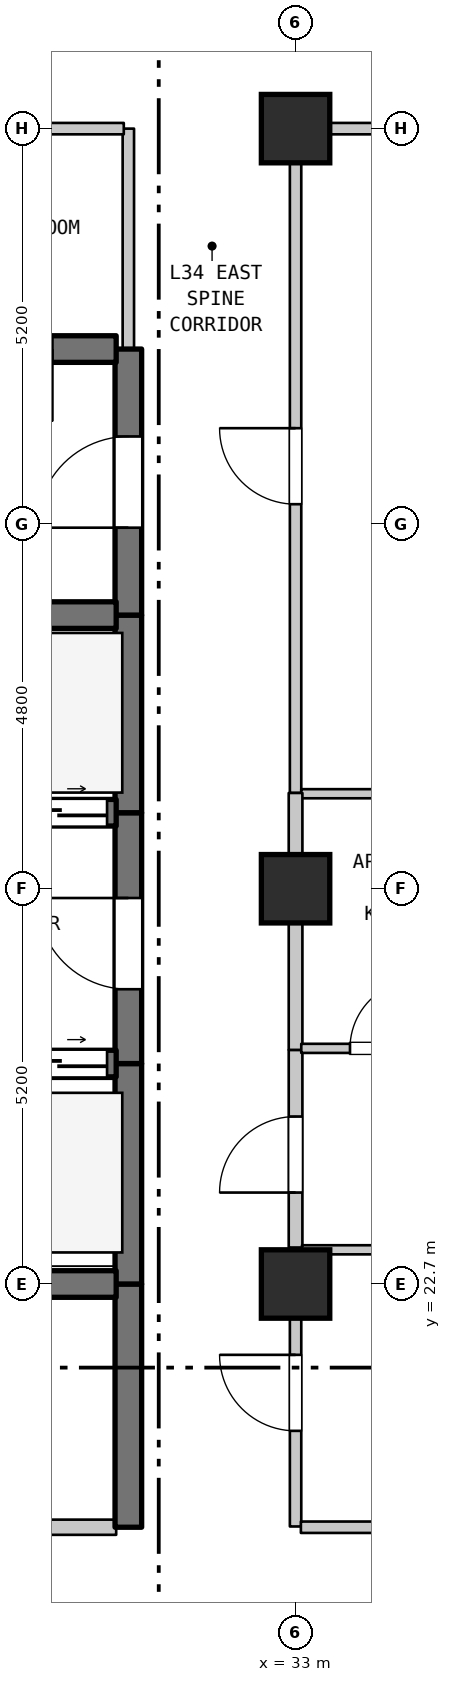
"""IFC4 building model, lengths in metres.
Left out: names, types, materials, properties, quantities, classifications, styles, units other than length and angle.
Written with IfcOpenShell. Run it as: python <this file> out.ifc"""

import sys

from ifc_helpers import new_model, si_unit, direction, frame, frame_2d, origin, origin_2d, place, context, subcontext, project, spatial, rectangle, extrude, element, fill, save


model = new_model("IFC4")
c1 = context("Model", 3, precision=1e-05, world=origin(), true_north=direction((0.0, 1.0)))
c2 = subcontext(c1, "Body", "Model", "MODEL_VIEW")
j1 = project(units=[si_unit("LENGTHUNIT", "METRE"), si_unit("PLANEANGLEUNIT", "RADIAN")], contexts=[c1])
p1 = place(None, origin())
s1 = spatial("IfcSite", under=j1, at=p1, CompositionType="ELEMENT")
p2 = place(p1, origin())
s2 = spatial("IfcBuilding", under=s1, at=p2, CompositionType="ELEMENT")
p3 = place(p2, frame((0.0, 0.0, 140.9)))
s3 = spatial("IfcBuildingStorey", under=s2, at=p3, CompositionType="ELEMENT", Elevation=140.9)
for number, where, z_axis, x_axis in (
    (1, (33.0, 22.7, 0.0), (0.0, 0.0, 1.0), (1.0, 0.0, 0.0)),
    (2, (33.0, 27.9, 0.0), (0.0, 0.0, 1.0), (1.0, 0.0, 0.0)),
    (3, (33.0, 37.9, 0.0), (0.0, 0.0, 1.0), (1.0, 0.0, 0.0)),
):
    element("IfcColumn", number, at=place(p3, frame(where, z_axis=z_axis, x_axis=x_axis)), inside=s3, PredefinedType="COLUMN", context=c2, shape_type="SweptSolid", body=[
        extrude(rectangle(XDim=0.9, YDim=0.9, at=origin_2d()), origin(), (0.0, 0.0, 1.0), 3.7),
    ])
p4 = place(p3, frame((30.8, 19.5, 0.0), z_axis=(0.0, 0.0, 1.0), x_axis=(0.0, 1.0, 0.0)))
e4 = element("IfcWall", 4, at=p4, inside=s3, PredefinedType="SHEAR", context=c2, shape_type="SweptSolid", body=[
    extrude(rectangle(XDim=3.2, YDim=0.35, at=frame_2d((1.6, 0.0))), origin(), (0.0, 0.0, 1.0), 3.385),
])
p5 = place(p3, frame((30.8, 22.7, 0.0), z_axis=(0.0, 0.0, 1.0), x_axis=(0.0, 1.0, 0.0)))
e5 = element("IfcWall", 5, at=p5, inside=s3, PredefinedType="SHEAR", context=c2, shape_type="SweptSolid", body=[
    extrude(rectangle(XDim=2.9, YDim=0.35, at=frame_2d((1.45, 0.0))), origin(), (0.0, 0.0, 1.0), 3.385),
])
p6 = place(p3, frame((30.8, 25.6, 0.0), z_axis=(0.0, 0.0, 1.0), x_axis=(0.0, 1.0, 0.0)))
e6 = element("IfcWall", 6, at=p6, inside=s3, PredefinedType="SHEAR", context=c2, shape_type="SweptSolid", body=[
    extrude(rectangle(XDim=3.3, YDim=0.35, at=frame_2d((1.65, 0.0))), origin(), (0.0, 0.0, 1.0), 3.385),
])
p7 = place(p6, frame((0.978, 0.0, 0.0)))
e7 = element("IfcOpeningElement", 7, at=p7, cuts=e6, PredefinedType="OPENING", context=c2, shape_type="SweptSolid", body=[
    extrude(rectangle(XDim=1.2, YDim=2.2, at=frame_2d((0.6, 1.1))), frame((0.0, 0.185, 0.0), z_axis=(0.0, -1.0, 0.0), x_axis=(1.0, 0.0, 0.0)), (0.0, 0.0, 1.0), 0.37),
])
p8 = place(p3, frame((30.8, 28.9, 0.0), z_axis=(0.0, 0.0, 1.0), x_axis=(0.0, 1.0, 0.0)))
e8 = element("IfcWall", 8, at=p8, inside=s3, PredefinedType="SHEAR", context=c2, shape_type="SweptSolid", body=[
    extrude(rectangle(XDim=2.6, YDim=0.35, at=frame_2d((1.3, 0.0))), origin(), (0.0, 0.0, 1.0), 3.385),
])
p9 = place(p3, frame((30.8, 31.5, 0.0), z_axis=(0.0, 0.0, 1.0), x_axis=(0.0, 1.0, 0.0)))
e9 = element("IfcWall", 9, at=p9, inside=s3, PredefinedType="SHEAR", context=c2, shape_type="SweptSolid", body=[
    extrude(rectangle(XDim=3.5, YDim=0.35, at=frame_2d((1.75, 0.0))), origin(), (0.0, 0.0, 1.0), 3.385),
])
p10 = place(p9, frame((1.15, 0.0, 0.0)))
e10 = element("IfcOpeningElement", 10, at=p10, cuts=e9, PredefinedType="OPENING", context=c2, shape_type="SweptSolid", body=[
    extrude(rectangle(XDim=1.2, YDim=2.2, at=frame_2d((0.6, 1.1))), frame((0.0, 0.185, 0.0), z_axis=(0.0, -1.0, 0.0), x_axis=(1.0, 0.0, 0.0)), (0.0, 0.0, 1.0), 0.37),
])
p11 = place(p3, frame((30.8, 35.0, 0.0), z_axis=(0.0, 0.0, 1.0), x_axis=(0.0, 1.0, 0.0)))
e11 = element("IfcWall", 11, at=p11, inside=s3, PredefinedType="STANDARD", context=c2, shape_type="SweptSolid", body=[
    extrude(rectangle(XDim=2.9, YDim=0.15, at=frame_2d((1.45, 0.0))), origin(), (0.0, 0.0, 1.0), 3.385),
])
p12 = place(p3, frame((33.0, 19.51, 0.0), z_axis=(0.0, 0.0, 1.0), x_axis=(0.0, 1.0, 0.0)))
e12 = element("IfcWall", 12, at=p12, inside=s3, PredefinedType="STANDARD", context=c2, shape_type="SweptSolid", body=[
    extrude(rectangle(XDim=3.66, YDim=0.15, at=frame_2d((1.83, 0.0))), origin(), (0.0, 0.0, 1.0), 2.935),
])
p13 = place(p12, frame((1.258, 0.0, 0.0)))
e13 = element("IfcOpeningElement", 13, at=p13, cuts=e12, PredefinedType="OPENING", context=c2, shape_type="SweptSolid", body=[
    extrude(rectangle(XDim=1.0, YDim=2.15, at=frame_2d((0.5, 1.075))), frame((0.0, 0.085, 0.0), z_axis=(0.0, -1.0, 0.0), x_axis=(1.0, 0.0, 0.0)), (0.0, 0.0, 1.0), 0.17),
])
p14 = place(p3, frame((33.0, 23.18, 0.0), z_axis=(0.0, 0.0, 1.0), x_axis=(0.0, 1.0, 0.0)))
e14 = element("IfcWall", 14, at=p14, inside=s3, PredefinedType="STANDARD", context=c2, shape_type="SweptSolid", body=[
    extrude(rectangle(XDim=2.6, YDim=0.18, at=frame_2d((1.3, 0.0))), origin(), (0.0, 0.0, 1.0), 2.935),
])
p15 = place(p14, frame((0.723, 0.0, 0.0)))
e15 = element("IfcOpeningElement", 15, at=p15, cuts=e14, PredefinedType="OPENING", context=c2, shape_type="SweptSolid", body=[
    extrude(rectangle(XDim=1.0, YDim=2.15, at=frame_2d((0.5, 1.075))), frame((0.0, 0.1, 0.0), z_axis=(0.0, -1.0, 0.0), x_axis=(1.0, 0.0, 0.0)), (0.0, 0.0, 1.0), 0.2),
])
p16 = place(p3, frame((33.0, 25.78, 0.0), z_axis=(0.0, 0.0, 1.0), x_axis=(0.0, 1.0, 0.0)))
e16 = element("IfcWall", 16, at=p16, inside=s3, PredefinedType="STANDARD", context=c2, shape_type="SweptSolid", body=[
    extrude(rectangle(XDim=2.12, YDim=0.18, at=frame_2d((1.06, 0.0))), origin(), (0.0, 0.0, 1.0), 2.935),
])
p17 = place(p3, frame((33.0, 29.16, 0.0), z_axis=(0.0, 0.0, 1.0), x_axis=(0.0, 1.0, 0.0)))
e17 = element("IfcWall", 17, at=p17, inside=s3, PredefinedType="STANDARD", context=c2, shape_type="SweptSolid", body=[
    extrude(rectangle(XDim=8.74, YDim=0.15, at=frame_2d((4.37, 0.0))), origin(), (0.0, 0.0, 1.0), 2.885),
])
p18 = place(p17, frame((3.799, 0.0, 0.0)))
e18 = element("IfcOpeningElement", 18, at=p18, cuts=e17, PredefinedType="OPENING", context=c2, shape_type="SweptSolid", body=[
    extrude(rectangle(XDim=1.0, YDim=2.15, at=frame_2d((0.5, 1.075))), frame((0.0, 0.085, 0.0), z_axis=(0.0, -1.0, 0.0), x_axis=(1.0, 0.0, 0.0)), (0.0, 0.0, 1.0), 0.17),
])
p19 = place(p3, frame((25.985, 19.5, 0.0), z_axis=(0.0, 0.0, 1.0), x_axis=(1.0, 0.0, 0.0)))
e19 = element("IfcWall", 19, at=p19, inside=s3, PredefinedType="STANDARD", context=c2, shape_type="SweptSolid", body=[
    extrude(rectangle(XDim=4.655, YDim=0.2, at=frame_2d((2.327, 0.0))), origin(), (0.0, 0.0, 1.0), 3.385),
])
p20 = place(p19, frame((1.845, 0.0, 0.0)))
e20 = element("IfcOpeningElement", 20, at=p20, cuts=e19, PredefinedType="OPENING", context=c2, shape_type="SweptSolid", body=[
    extrude(rectangle(XDim=0.9, YDim=2.15, at=frame_2d((0.45, 1.075))), frame((0.0, 0.11, 0.0), z_axis=(0.0, -1.0, 0.0), x_axis=(1.0, 0.0, 0.0)), (0.0, 0.0, 1.0), 0.22),
])
p21 = place(p3, frame((33.07, 19.5, 0.0), z_axis=(0.0, 0.0, 1.0), x_axis=(1.0, 0.0, 0.0)))
e21 = element("IfcWall", 21, at=p21, inside=s3, PredefinedType="STANDARD", context=c2, shape_type="SweptSolid", body=[
    extrude(rectangle(XDim=21.51, YDim=0.15, at=frame_2d((10.755, 0.0))), origin(), (0.0, 0.0, 1.0), 3.385),
])
p22 = place(p21, frame((10.185, 0.0, 0.0)))
e22 = element("IfcOpeningElement", 22, at=p22, cuts=e21, PredefinedType="OPENING", context=c2, shape_type="SweptSolid", body=[
    extrude(rectangle(XDim=1.0, YDim=2.15, at=frame_2d((0.5, 1.075))), frame((0.0, 0.085, 0.0), z_axis=(0.0, -1.0, 0.0), x_axis=(1.0, 0.0, 0.0)), (0.0, 0.0, 1.0), 0.17),
])
p23 = place(p3, frame((27.46, 22.7, 0.0), z_axis=(0.0, 0.0, 1.0), x_axis=(1.0, 0.0, 0.0)))
e23 = element("IfcWall", 23, at=p23, inside=s3, PredefinedType="SHEAR", context=c2, shape_type="SweptSolid", body=[
    extrude(rectangle(XDim=3.18, YDim=0.35, at=frame_2d((1.59, 0.0))), origin(), (0.0, 0.0, 1.0), 3.385),
])
p24 = place(p3, frame((33.085, 23.15, 0.0), z_axis=(0.0, 0.0, 1.0), x_axis=(1.0, 0.0, 0.0)))
e24 = element("IfcWall", 24, at=p24, inside=s3, PredefinedType="PARTITIONING", context=c2, shape_type="SweptSolid", body=[
    extrude(rectangle(XDim=23.905, YDim=0.12, at=frame_2d((11.953, 0.0))), origin(), (0.0, 0.0, 1.0), 3.385),
])
p25 = place(p3, frame((27.46, 25.6, 0.0), z_axis=(0.0, 0.0, 1.0), x_axis=(1.0, 0.0, 0.0)))
e25 = element("IfcWall", 25, at=p25, inside=s3, PredefinedType="SHEAR", context=c2, shape_type="SweptSolid", body=[
    extrude(rectangle(XDim=3.18, YDim=0.35, at=frame_2d((1.59, 0.0))), origin(), (0.0, 0.0, 1.0), 3.385),
])
p26 = place(p25, frame((0.12, 0.0, 0.0)))
e26 = element("IfcOpeningElement", 26, at=p26, cuts=e25, PredefinedType="OPENING", context=c2, shape_type="SweptSolid", body=[
    extrude(rectangle(XDim=1.25, YDim=2.2, at=frame_2d((0.625, 1.1))), frame((0.0, 0.185, 0.0), z_axis=(0.0, -1.0, 0.0), x_axis=(1.0, 0.0, 0.0)), (0.0, 0.0, 1.0), 0.37),
])
p27 = place(p25, frame((1.81, 0.0, 0.0)))
e27 = element("IfcOpeningElement", 27, at=p27, cuts=e25, PredefinedType="OPENING", context=c2, shape_type="SweptSolid", body=[
    extrude(rectangle(XDim=1.25, YDim=2.2, at=frame_2d((0.625, 1.1))), frame((0.0, 0.185, 0.0), z_axis=(0.0, -1.0, 0.0), x_axis=(1.0, 0.0, 0.0)), (0.0, 0.0, 1.0), 0.37),
])
p28 = place(p3, frame((33.075, 25.8, 0.0), z_axis=(0.0, 0.0, 1.0), x_axis=(1.0, 0.0, 0.0)))
e28 = element("IfcWall", 28, at=p28, inside=s3, PredefinedType="PARTITIONING", context=c2, shape_type="SweptSolid", body=[
    extrude(rectangle(XDim=2.364, YDim=0.12, at=frame_2d((1.182, 0.0))), origin(), (0.0, 0.0, 1.0), 3.385),
])
p29 = place(p28, frame((0.641, 0.0, 0.0)))
e29 = element("IfcOpeningElement", 29, at=p29, cuts=e28, PredefinedType="OPENING", context=c2, shape_type="SweptSolid", body=[
    extrude(rectangle(XDim=0.9, YDim=2.15, at=frame_2d((0.45, 1.075))), frame((0.0, 0.07, 0.0), z_axis=(0.0, -1.0, 0.0), x_axis=(1.0, 0.0, 0.0)), (0.0, 0.0, 1.0), 0.14),
])
p30 = place(p3, frame((27.46, 28.9, 0.0), z_axis=(0.0, 0.0, 1.0), x_axis=(1.0, 0.0, 0.0)))
e30 = element("IfcWall", 30, at=p30, inside=s3, PredefinedType="SHEAR", context=c2, shape_type="SweptSolid", body=[
    extrude(rectangle(XDim=3.18, YDim=0.35, at=frame_2d((1.59, 0.0))), origin(), (0.0, 0.0, 1.0), 3.385),
])
p31 = place(p30, frame((0.12, 0.0, 0.0)))
e31 = element("IfcOpeningElement", 31, at=p31, cuts=e30, PredefinedType="OPENING", context=c2, shape_type="SweptSolid", body=[
    extrude(rectangle(XDim=1.25, YDim=2.2, at=frame_2d((0.625, 1.1))), frame((0.0, 0.185, 0.0), z_axis=(0.0, -1.0, 0.0), x_axis=(1.0, 0.0, 0.0)), (0.0, 0.0, 1.0), 0.37),
])
p32 = place(p30, frame((1.81, 0.0, 0.0)))
e32 = element("IfcOpeningElement", 32, at=p32, cuts=e30, PredefinedType="OPENING", context=c2, shape_type="SweptSolid", body=[
    extrude(rectangle(XDim=1.25, YDim=2.2, at=frame_2d((0.625, 1.1))), frame((0.0, 0.185, 0.0), z_axis=(0.0, -1.0, 0.0), x_axis=(1.0, 0.0, 0.0)), (0.0, 0.0, 1.0), 0.37),
])
p33 = place(p3, frame((33.075, 29.15, 0.0), z_axis=(0.0, 0.0, 1.0), x_axis=(1.0, 0.0, 0.0)))
e33 = element("IfcWall", 33, at=p33, inside=s3, PredefinedType="PARTITIONING", context=c2, shape_type="SweptSolid", body=[
    extrude(rectangle(XDim=2.364, YDim=0.12, at=frame_2d((1.182, 0.0))), origin(), (0.0, 0.0, 1.0), 3.385),
])
p34 = place(p3, frame((27.46, 31.5, 0.0), z_axis=(0.0, 0.0, 1.0), x_axis=(1.0, 0.0, 0.0)))
e34 = element("IfcWall", 34, at=p34, inside=s3, PredefinedType="SHEAR", context=c2, shape_type="SweptSolid", body=[
    extrude(rectangle(XDim=3.18, YDim=0.35, at=frame_2d((1.59, 0.0))), origin(), (0.0, 0.0, 1.0), 3.385),
])
p35 = place(p3, frame((28.045, 35.0, 0.0), z_axis=(0.0, 0.0, 1.0), x_axis=(1.0, 0.0, 0.0)))
e35 = element("IfcWall", 35, at=p35, inside=s3, PredefinedType="SHEAR", context=c2, shape_type="SweptSolid", body=[
    extrude(rectangle(XDim=2.595, YDim=0.35, at=frame_2d((1.297, 0.0))), origin(), (0.0, 0.0, 1.0), 3.385),
])
p36 = place(p35, frame((0.806, 0.0, 0.0)))
e36 = element("IfcOpeningElement", 36, at=p36, cuts=e35, PredefinedType="OPENING", context=c2, shape_type="SweptSolid", body=[
    extrude(rectangle(XDim=0.95, YDim=2.15, at=frame_2d((0.475, 1.075))), frame((0.0, 0.185, 0.0), z_axis=(0.0, -1.0, 0.0), x_axis=(1.0, 0.0, 0.0)), (0.0, 0.0, 1.0), 0.37),
])
p37 = place(p3, frame((28.045, 37.9, 0.0), z_axis=(0.0, 0.0, 1.0), x_axis=(1.0, 0.0, 0.0)))
e37 = element("IfcWall", 37, at=p37, inside=s3, PredefinedType="STANDARD", context=c2, shape_type="SweptSolid", body=[
    extrude(rectangle(XDim=2.695, YDim=0.15, at=frame_2d((1.348, 0.0))), origin(), (0.0, 0.0, 1.0), 2.885),
])
p38 = place(p3, frame((33.06, 37.9, 0.0), z_axis=(0.0, 0.0, 1.0), x_axis=(1.0, 0.0, 0.0)))
e38 = element("IfcWall", 38, at=p38, inside=s3, PredefinedType="STANDARD", context=c2, shape_type="SweptSolid", body=[
    extrude(rectangle(XDim=11.879, YDim=0.15, at=frame_2d((5.939, 0.0))), origin(), (0.0, 0.0, 1.0), 3.385),
])
p39 = place(p38, frame((5.439, 0.0, 0.0)))
e39 = element("IfcOpeningElement", 39, at=p39, cuts=e38, PredefinedType="OPENING", context=c2, shape_type="SweptSolid", body=[
    extrude(rectangle(XDim=1.0, YDim=2.15, at=frame_2d((0.5, 1.075))), frame((0.0, 0.085, 0.0), z_axis=(0.0, -1.0, 0.0), x_axis=(1.0, 0.0, 0.0)), (0.0, 0.0, 1.0), 0.17),
])
p40 = place(p3, frame((33.0, 27.9, 0.0), z_axis=(0.0, 0.0, 1.0), x_axis=(0.0, 1.0, 0.0)))
e40 = element("IfcWall", 40, at=p40, inside=s3, PredefinedType="STANDARD", context=c2, shape_type="SweptSolid", body=[
    extrude(rectangle(XDim=1.26, YDim=0.18, at=frame_2d((0.63, 0.0))), origin(), (0.0, 0.0, 1.0), 2.885),
])
p41 = place(p7, origin())
e41 = element("IfcDoor", 41, at=p41, inside=s3, OperationType="SINGLE_SWING_RIGHT", PredefinedType="DOOR", context=c2, shape_type="SweptSolid", body=[
    extrude(rectangle(XDim=1.2, YDim=2.2, at=frame_2d((0.6, 1.1))), frame((0.0, 0.025, 0.0), z_axis=(0.0, -1.0, 0.0), x_axis=(1.0, 0.0, 0.0)), (0.0, 0.0, 1.0), 0.05),
])
fill(e7, e41)
p42 = place(p10, origin())
e42 = element("IfcDoor", 42, at=p42, inside=s3, OperationType="SINGLE_SWING_LEFT", PredefinedType="DOOR", context=c2, shape_type="SweptSolid", body=[
    extrude(rectangle(XDim=1.2, YDim=2.2, at=frame_2d((0.6, 1.1))), frame((0.0, 0.025, 0.0), z_axis=(0.0, -1.0, 0.0), x_axis=(1.0, 0.0, 0.0)), (0.0, 0.0, 1.0), 0.05),
])
fill(e10, e42)
p43 = place(p13, origin())
e43 = element("IfcDoor", 43, at=p43, inside=s3, OperationType="SINGLE_SWING_RIGHT", PredefinedType="DOOR", context=c2, shape_type="SweptSolid", body=[
    extrude(rectangle(XDim=1.0, YDim=2.15, at=frame_2d((0.5, 1.075))), frame((0.0, 0.025, 0.0), z_axis=(0.0, -1.0, 0.0), x_axis=(1.0, 0.0, 0.0)), (0.0, 0.0, 1.0), 0.05),
])
fill(e13, e43)
p44 = place(p15, origin())
e44 = element("IfcDoor", 44, at=p44, inside=s3, OperationType="SINGLE_SWING_LEFT", PredefinedType="DOOR", context=c2, shape_type="SweptSolid", body=[
    extrude(rectangle(XDim=1.0, YDim=2.15, at=frame_2d((0.5, 1.075))), frame((0.0, 0.025, 0.0), z_axis=(0.0, -1.0, 0.0), x_axis=(1.0, 0.0, 0.0)), (0.0, 0.0, 1.0), 0.05),
])
fill(e15, e44)
p45 = place(p18, origin())
e45 = element("IfcDoor", 45, at=p45, inside=s3, OperationType="SINGLE_SWING_RIGHT", PredefinedType="DOOR", context=c2, shape_type="SweptSolid", body=[
    extrude(rectangle(XDim=1.0, YDim=2.15, at=frame_2d((0.5, 1.075))), frame((0.0, 0.025, 0.0), z_axis=(0.0, -1.0, 0.0), x_axis=(1.0, 0.0, 0.0)), (0.0, 0.0, 1.0), 0.05),
])
fill(e18, e45)
p46 = place(p27, origin())
e46 = element("IfcDoor", 46, at=p46, inside=s3, OperationType="DOUBLE_DOOR_SLIDING", PredefinedType="DOOR", context=c2, shape_type="SweptSolid", body=[
    extrude(rectangle(XDim=1.25, YDim=2.2, at=frame_2d((0.625, 1.1))), frame((0.0, 0.025, 0.0), z_axis=(0.0, -1.0, 0.0), x_axis=(1.0, 0.0, 0.0)), (0.0, 0.0, 1.0), 0.05),
])
fill(e27, e46)
p47 = place(p29, origin())
e47 = element("IfcDoor", 47, at=p47, inside=s3, OperationType="SINGLE_SWING_RIGHT", PredefinedType="DOOR", context=c2, shape_type="SweptSolid", body=[
    extrude(rectangle(XDim=0.9, YDim=2.15, at=frame_2d((0.45, 1.075))), frame((0.0, 0.025, 0.0), z_axis=(0.0, -1.0, 0.0), x_axis=(1.0, 0.0, 0.0)), (0.0, 0.0, 1.0), 0.05),
])
fill(e29, e47)
p48 = place(p32, origin())
e48 = element("IfcDoor", 48, at=p48, inside=s3, OperationType="DOUBLE_DOOR_SLIDING", PredefinedType="DOOR", context=c2, shape_type="SweptSolid", body=[
    extrude(rectangle(XDim=1.25, YDim=2.2, at=frame_2d((0.625, 1.1))), frame((0.0, 0.025, 0.0), z_axis=(0.0, -1.0, 0.0), x_axis=(1.0, 0.0, 0.0)), (0.0, 0.0, 1.0), 0.05),
])
fill(e32, e48)
p49 = place(p36, frame((0.95, 0.0, 0.0), z_axis=(0.0, 0.0, 1.0), x_axis=(-1.0, 0.0, 0.0)))
e49 = element("IfcDoor", 49, at=p49, inside=s3, OperationType="SINGLE_SWING_RIGHT", PredefinedType="DOOR", context=c2, shape_type="SweptSolid", body=[
    extrude(rectangle(XDim=0.95, YDim=2.15, at=frame_2d((0.475, 1.075))), frame((0.0, 0.025, 0.0), z_axis=(0.0, -1.0, 0.0), x_axis=(1.0, 0.0, 0.0)), (0.0, 0.0, 1.0), 0.05),
])
fill(e36, e49)
save(model, sys.argv[1])
